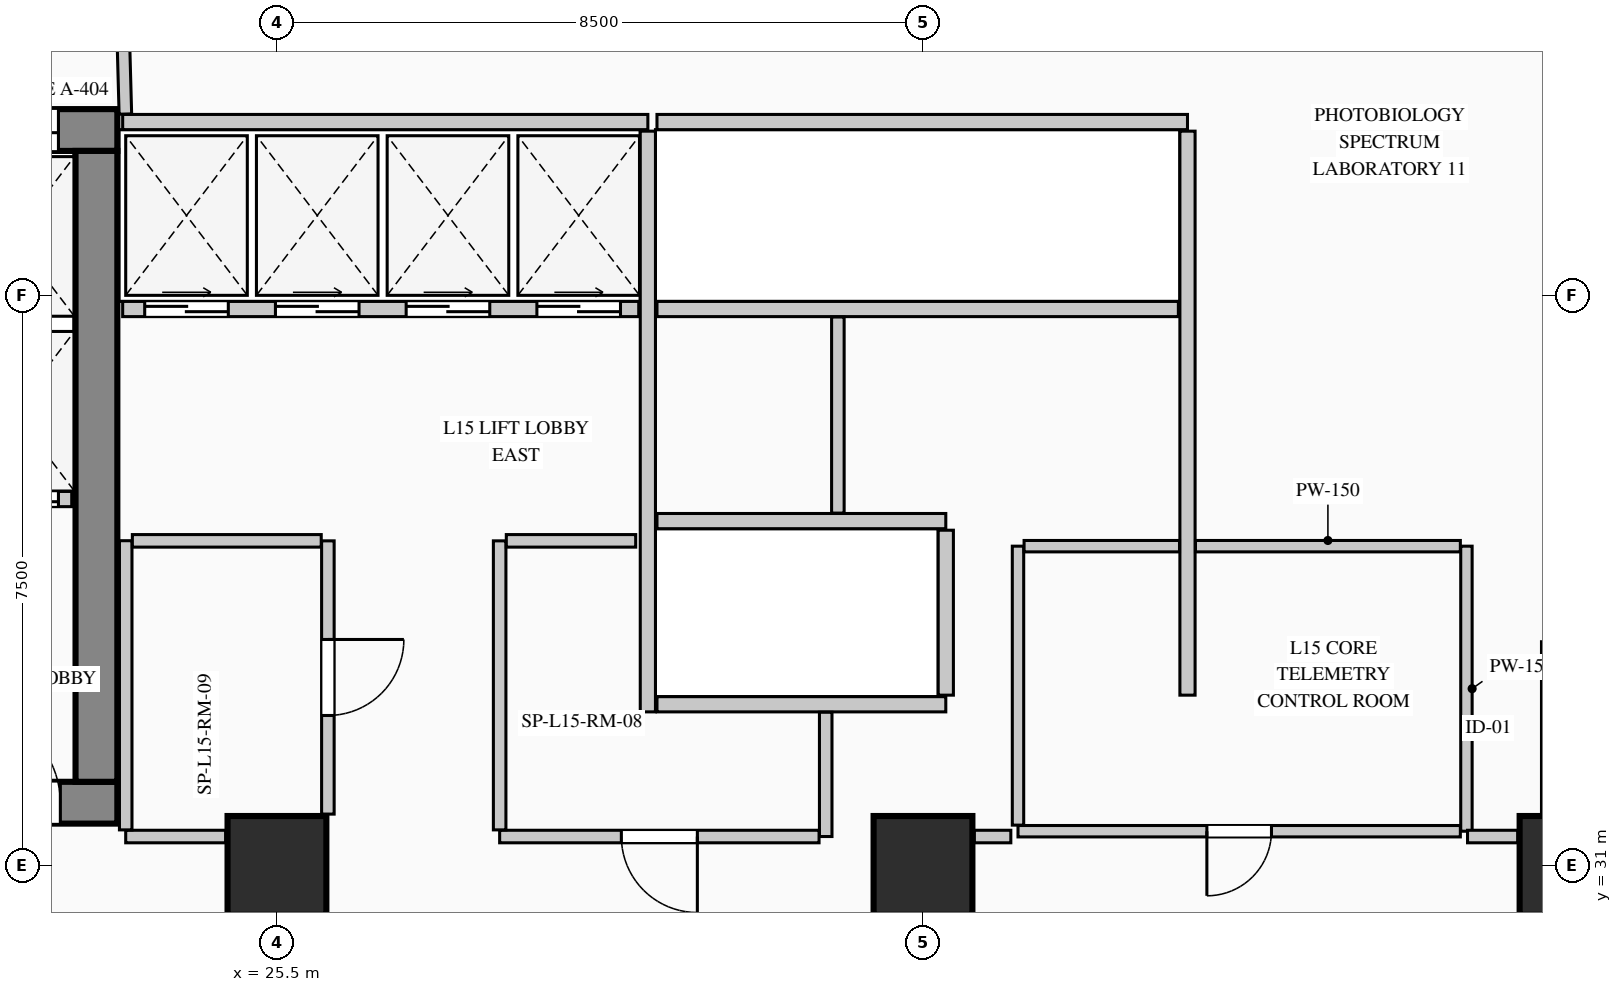
"""IFC4 building model, lengths in metres.
Left out: names, types, materials, properties, quantities, classifications, styles, units other than length and angle.
Written with IfcOpenShell. Run it as: python <this file> out.ifc"""

import sys

from ifc_helpers import new_model, si_unit, direction, frame, frame_2d, origin, origin_2d, place, context, subcontext, project, spatial, rectangle, extrude, element, fill, save


model = new_model("IFC4")
c1 = context("Model", 3, precision=1e-05, world=origin(), true_north=direction((0.0, 1.0)))
c2 = subcontext(c1, "Body", "Model", "MODEL_VIEW")
j1 = project(units=[si_unit("LENGTHUNIT", "METRE"), si_unit("PLANEANGLEUNIT", "RADIAN")], contexts=[c1])
p1 = place(None, origin())
s1 = spatial("IfcSite", under=j1, at=p1, CompositionType="ELEMENT")
p2 = place(p1, origin())
s2 = spatial("IfcBuilding", under=s1, at=p2, CompositionType="ELEMENT")
p3 = place(p2, frame((0.0, 0.0, 66.6)))
s3 = spatial("IfcBuildingStorey", under=s2, at=p3, CompositionType="ELEMENT", Elevation=66.6)
p4 = place(p3, frame((5.45, 40.675, 0.0), z_axis=(0.0, 0.0, 1.0), x_axis=(1.0, 0.0, 0.0)))
e1 = element("IfcWall", 1, at=p4, inside=s3, PredefinedType="SHEAR", context=c2, shape_type="SweptSolid", body=[
    extrude(rectangle(XDim=17.95, YDim=0.55, at=frame_2d((8.975, 0.0))), origin(), (0.0, 0.0, 1.0), 4.4),
])
p5 = place(p4, frame((15.995, 0.0, 0.0)))
e2 = element("IfcOpeningElement", 2, at=p5, cuts=e1, PredefinedType="OPENING", context=c2, shape_type="SweptSolid", body=[
    extrude(rectangle(XDim=1.18, YDim=2.25, at=frame_2d((0.59, 1.125))), frame((0.0, 0.285, 0.0), z_axis=(0.0, -1.0, 0.0), x_axis=(1.0, 0.0, 0.0)), (0.0, 0.0, 1.0), 0.57),
])
p6 = place(p3, frame((5.45, 31.825, 0.0), z_axis=(0.0, 0.0, 1.0), x_axis=(1.0, 0.0, 0.0)))
e3 = element("IfcWall", 3, at=p6, inside=s3, PredefinedType="SHEAR", context=c2, shape_type="SweptSolid", body=[
    extrude(rectangle(XDim=17.95, YDim=0.55, at=frame_2d((8.975, 0.0))), origin(), (0.0, 0.0, 1.0), 4.4),
])
p7 = place(p6, frame((3.2, 0.0, 0.0)))
e4 = element("IfcOpeningElement", 4, at=p7, cuts=e3, PredefinedType="OPENING", context=c2, shape_type="SweptSolid", body=[
    extrude(rectangle(XDim=1.2, YDim=2.2, at=frame_2d((0.6, 1.1))), frame((0.0, 0.285, 0.0), z_axis=(0.0, -1.0, 0.0), x_axis=(1.0, 0.0, 0.0)), (0.0, 0.0, 1.0), 0.57),
])
p8 = place(p6, frame((7.05, 0.0, 0.0)))
e5 = element("IfcOpeningElement", 5, at=p8, cuts=e3, PredefinedType="OPENING", context=c2, shape_type="SweptSolid", body=[
    extrude(rectangle(XDim=1.2, YDim=2.2, at=frame_2d((0.6, 1.1))), frame((0.0, 0.285, 0.0), z_axis=(0.0, -1.0, 0.0), x_axis=(1.0, 0.0, 0.0)), (0.0, 0.0, 1.0), 0.57),
])
p9 = place(p6, frame((8.9, 0.0, 0.0)))
e6 = element("IfcOpeningElement", 6, at=p9, cuts=e3, PredefinedType="OPENING", context=c2, shape_type="SweptSolid", body=[
    extrude(rectangle(XDim=1.15, YDim=2.2, at=frame_2d((0.575, 1.1))), frame((0.0, 0.285, 0.0), z_axis=(0.0, -1.0, 0.0), x_axis=(1.0, 0.0, 0.0)), (0.0, 0.0, 1.0), 0.57),
])
p10 = place(p6, frame((16.0, 0.0, 0.0)))
e7 = element("IfcOpeningElement", 7, at=p10, cuts=e3, PredefinedType="OPENING", context=c2, shape_type="SweptSolid", body=[
    extrude(rectangle(XDim=1.2, YDim=2.2, at=frame_2d((0.6, 1.1))), frame((0.0, 0.285, 0.0), z_axis=(0.0, -1.0, 0.0), x_axis=(1.0, 0.0, 0.0)), (0.0, 0.0, 1.0), 0.57),
])
p11 = place(p3, frame((23.125, 32.1, 0.0), z_axis=(0.0, 0.0, 1.0), x_axis=(0.0, 1.0, 0.0)))
e8 = element("IfcWall", 8, at=p11, inside=s3, PredefinedType="SHEAR", context=c2, shape_type="SweptSolid", body=[
    extrude(rectangle(XDim=8.3, YDim=0.55, at=frame_2d((4.15, 0.0))), origin(), (0.0, 0.0, 1.0), 4.4),
])
for number, where, z_axis, x_axis in (
    (9, (25.5, 31.0, 0.0), (0.0, 0.0, 1.0), (1.0, 0.0, 0.0)),
    (10, (34.0, 31.0, 0.0), (0.0, 0.0, 1.0), (1.0, 0.0, 0.0)),
    (11, (42.5, 31.0, 0.0), (0.0, 0.0, 1.0), (1.0, 0.0, 0.0)),
):
    element("IfcColumn", number, at=place(p3, frame(where, z_axis=z_axis, x_axis=x_axis)), inside=s3, PredefinedType="COLUMN", context=c2, shape_type="SweptSolid", body=[
        extrude(rectangle(XDim=1.3, YDim=1.3, at=origin_2d()), origin(), (0.0, 0.0, 1.0), 4.4),
    ])
p12 = place(p3, frame((21.3, 35.82, 0.0), z_axis=(0.0, 0.0, 1.0), x_axis=(1.0, 0.0, 0.0)))
e12 = element("IfcWall", 12, at=p12, inside=s3, PredefinedType="PARTITIONING", context=c2, shape_type="SweptSolid", body=[
    extrude(rectangle(XDim=1.5, YDim=0.2, at=frame_2d((0.75, 0.0))), origin(), (0.0, 0.0, 1.0), 4.1),
])
p13 = place(p12, frame((0.145, 0.0, 0.0)))
e13 = element("IfcOpeningElement", 13, at=p13, cuts=e12, PredefinedType="OPENING", context=c2, shape_type="SweptSolid", body=[
    extrude(rectangle(XDim=1.18, YDim=2.25, at=frame_2d((0.59, 1.125))), frame((0.0, 0.11, 0.0), z_axis=(0.0, -1.0, 0.0), x_axis=(1.0, 0.0, 0.0)), (0.0, 0.0, 1.0), 0.22),
])
p14 = place(p3, frame((23.47, 40.78, 0.0), z_axis=(0.0, 0.0, 1.0), x_axis=(1.0, 0.0, 0.0)))
e14 = element("IfcWall", 14, at=p14, inside=s3, PredefinedType="PARTITIONING", context=c2, shape_type="SweptSolid", body=[
    extrude(rectangle(XDim=6.91, YDim=0.2, at=frame_2d((3.455, 0.0))), origin(), (0.0, 0.0, 1.0), 4.1),
])
p15 = place(p3, frame((30.38, 33.02, 0.0), z_axis=(0.0, 0.0, 1.0), x_axis=(0.0, 1.0, 0.0)))
e15 = element("IfcWall", 15, at=p15, inside=s3, PredefinedType="PARTITIONING", context=c2, shape_type="SweptSolid", body=[
    extrude(rectangle(XDim=7.64, YDim=0.2, at=frame_2d((3.82, 0.0))), origin(), (0.0, 0.0, 1.0), 4.1),
])
p16 = place(p3, frame((23.47, 38.32, 0.0), z_axis=(0.0, 0.0, 1.0), x_axis=(1.0, 0.0, 0.0)))
e16 = element("IfcWall", 16, at=p16, inside=s3, PredefinedType="PARTITIONING", context=c2, shape_type="SweptSolid", body=[
    extrude(rectangle(XDim=6.79, YDim=0.2, at=frame_2d((3.395, 0.0))), origin(), (0.0, 0.0, 1.0), 4.1),
])
p17 = place(p16, frame((0.29, 0.0, 0.0)))
e17 = element("IfcOpeningElement", 17, at=p17, cuts=e16, PredefinedType="OPENING", context=c2, shape_type="SweptSolid", body=[
    extrude(rectangle(XDim=1.1, YDim=2.2, at=frame_2d((0.55, 1.1))), frame((0.0, 0.11, 0.0), z_axis=(0.0, -1.0, 0.0), x_axis=(1.0, 0.0, 0.0)), (0.0, 0.0, 1.0), 0.22),
])
p18 = place(p16, frame((2.01, 0.0, 0.0)))
e18 = element("IfcOpeningElement", 18, at=p18, cuts=e16, PredefinedType="OPENING", context=c2, shape_type="SweptSolid", body=[
    extrude(rectangle(XDim=1.1, YDim=2.2, at=frame_2d((0.55, 1.1))), frame((0.0, 0.11, 0.0), z_axis=(0.0, -1.0, 0.0), x_axis=(1.0, 0.0, 0.0)), (0.0, 0.0, 1.0), 0.22),
])
p19 = place(p16, frame((3.73, 0.0, 0.0)))
e19 = element("IfcOpeningElement", 19, at=p19, cuts=e16, PredefinedType="OPENING", context=c2, shape_type="SweptSolid", body=[
    extrude(rectangle(XDim=1.1, YDim=2.2, at=frame_2d((0.55, 1.1))), frame((0.0, 0.11, 0.0), z_axis=(0.0, -1.0, 0.0), x_axis=(1.0, 0.0, 0.0)), (0.0, 0.0, 1.0), 0.22),
])
p20 = place(p16, frame((5.45, 0.0, 0.0)))
e20 = element("IfcOpeningElement", 20, at=p20, cuts=e16, PredefinedType="OPENING", context=c2, shape_type="SweptSolid", body=[
    extrude(rectangle(XDim=1.1, YDim=2.2, at=frame_2d((0.55, 1.1))), frame((0.0, 0.11, 0.0), z_axis=(0.0, -1.0, 0.0), x_axis=(1.0, 0.0, 0.0)), (0.0, 0.0, 1.0), 0.22),
])
p21 = place(p3, frame((30.5, 40.78, 0.0), z_axis=(0.0, 0.0, 1.0), x_axis=(1.0, 0.0, 0.0)))
e21 = element("IfcWall", 21, at=p21, inside=s3, PredefinedType="PARTITIONING", context=c2, shape_type="SweptSolid", body=[
    extrude(rectangle(XDim=6.98, YDim=0.2, at=frame_2d((3.49, 0.0))), origin(), (0.0, 0.0, 1.0), 4.1),
])
p22 = place(p3, frame((37.48, 33.24, 0.0), z_axis=(0.0, 0.0, 1.0), x_axis=(0.0, 1.0, 0.0)))
e22 = element("IfcWall", 22, at=p22, inside=s3, PredefinedType="PARTITIONING", context=c2, shape_type="SweptSolid", body=[
    extrude(rectangle(XDim=7.42, YDim=0.2, at=frame_2d((3.71, 0.0))), origin(), (0.0, 0.0, 1.0), 4.1),
])
p23 = place(p3, frame((30.5, 38.32, 0.0), z_axis=(0.0, 0.0, 1.0), x_axis=(1.0, 0.0, 0.0)))
e23 = element("IfcWall", 23, at=p23, inside=s3, PredefinedType="PARTITIONING", context=c2, shape_type="SweptSolid", body=[
    extrude(rectangle(XDim=6.86, YDim=0.2, at=frame_2d((3.43, 0.0))), origin(), (0.0, 0.0, 1.0), 4.1),
])
for number, where, z_axis, x_axis in (
    (24, (30.5, 35.53, 0.0), (0.0, 0.0, 1.0), (1.0, 0.0, 0.0)),
    (25, (30.5, 33.12, 0.0), (0.0, 0.0, 1.0), (1.0, 0.0, 0.0)),
):
    element("IfcWall", number, at=place(p3, frame(where, z_axis=z_axis, x_axis=x_axis)), inside=s3, PredefinedType="PARTITIONING", context=c2, shape_type="SweptSolid", body=[
        extrude(rectangle(XDim=3.8, YDim=0.2, at=frame_2d((1.9, 0.0))), origin(), (0.0, 0.0, 1.0), 4.1),
    ])
p24 = place(p3, frame((34.3, 33.24, 0.0), z_axis=(0.0, 0.0, 1.0), x_axis=(0.0, 1.0, 0.0)))
e26 = element("IfcWall", 26, at=p24, inside=s3, PredefinedType="PARTITIONING", context=c2, shape_type="SweptSolid", body=[
    extrude(rectangle(XDim=2.17, YDim=0.2, at=frame_2d((1.085, 0.0))), origin(), (0.0, 0.0, 1.0), 4.1),
])
p25 = place(p3, frame((41.15, 35.2, 0.0), z_axis=(0.0, 0.0, 1.0), x_axis=(0.0, -1.0, 0.0)))
e27 = element("IfcWall", 27, at=p25, inside=s3, PredefinedType="PARTITIONING", context=c2, shape_type="SweptSolid", body=[
    extrude(rectangle(XDim=3.75, YDim=0.15, at=frame_2d((1.875, 0.0))), origin(), (0.0, 0.0, 1.0), 4.1),
])
p26 = place(p3, frame((41.07, 31.45, 0.0), z_axis=(0.0, 0.0, 1.0), x_axis=(-1.0, 0.0, 0.0)))
e28 = element("IfcWall", 28, at=p26, inside=s3, PredefinedType="PARTITIONING", context=c2, shape_type="SweptSolid", body=[
    extrude(rectangle(XDim=5.82, YDim=0.15, at=frame_2d((2.91, 0.0))), origin(), (0.0, 0.0, 1.0), 4.1),
])
p27 = place(p26, frame((2.485, 0.0, 0.0)))
e29 = element("IfcOpeningElement", 29, at=p27, cuts=e28, PredefinedType="OPENING", context=c2, shape_type="SweptSolid", body=[
    extrude(rectangle(XDim=0.85, YDim=2.1, at=frame_2d((0.425, 1.05))), frame((0.0, 0.085, 0.0), z_axis=(0.0, -1.0, 0.0), x_axis=(1.0, 0.0, 0.0)), (0.0, 0.0, 1.0), 0.17),
])
p28 = place(p3, frame((35.25, 31.53, 0.0), z_axis=(0.0, 0.0, 1.0), x_axis=(0.0, 1.0, 0.0)))
e30 = element("IfcWall", 30, at=p28, inside=s3, PredefinedType="PARTITIONING", context=c2, shape_type="SweptSolid", body=[
    extrude(rectangle(XDim=3.67, YDim=0.15, at=frame_2d((1.835, 0.0))), origin(), (0.0, 0.0, 1.0), 4.1),
])
p29 = place(p3, frame((35.33, 35.2, 0.0), z_axis=(0.0, 0.0, 1.0), x_axis=(1.0, 0.0, 0.0)))
e31 = element("IfcWall", 31, at=p29, inside=s3, PredefinedType="PARTITIONING", context=c2, shape_type="SweptSolid", body=[
    extrude(rectangle(XDim=2.045, YDim=0.15, at=frame_2d((1.022, 0.0))), origin(), (0.0, 0.0, 1.0), 4.1),
])
p30 = place(p3, frame((37.585, 35.2, 0.0), z_axis=(0.0, 0.0, 1.0), x_axis=(1.0, 0.0, 0.0)))
e32 = element("IfcWall", 32, at=p30, inside=s3, PredefinedType="PARTITIONING", context=c2, shape_type="SweptSolid", body=[
    extrude(rectangle(XDim=3.485, YDim=0.15, at=frame_2d((1.743, 0.0))), origin(), (0.0, 0.0, 1.0), 4.1),
])
p31 = place(p3, frame((32.72, 33.015, 0.0), z_axis=(0.0, 0.0, 1.0), x_axis=(0.0, -1.0, 0.0)))
e33 = element("IfcWall", 33, at=p31, inside=s3, PredefinedType="PARTITIONING", context=c2, shape_type="SweptSolid", body=[
    extrude(rectangle(XDim=1.635, YDim=0.165, at=frame_2d((0.817, 0.0))), origin(), (0.0, 0.0, 1.0), 4.1),
])
p32 = place(p3, frame((32.633, 31.38, 0.0), z_axis=(0.0, 0.0, 1.0), x_axis=(-1.0, 0.0, 0.0)))
e34 = element("IfcWall", 34, at=p32, inside=s3, PredefinedType="PARTITIONING", context=c2, shape_type="SweptSolid", body=[
    extrude(rectangle(XDim=4.203, YDim=0.165, at=frame_2d((2.101, 0.0))), origin(), (0.0, 0.0, 1.0), 4.1),
])
p33 = place(p32, frame((1.601, 0.0, 0.0)))
e35 = element("IfcOpeningElement", 35, at=p33, cuts=e34, PredefinedType="OPENING", context=c2, shape_type="SweptSolid", body=[
    extrude(rectangle(XDim=1.0, YDim=2.15, at=frame_2d((0.5, 1.075))), frame((0.0, 0.093, 0.0), z_axis=(0.0, -1.0, 0.0), x_axis=(1.0, 0.0, 0.0)), (0.0, 0.0, 1.0), 0.185),
])
p34 = place(p3, frame((28.43, 31.468, 0.0), z_axis=(0.0, 0.0, 1.0), x_axis=(0.0, 1.0, 0.0)))
e36 = element("IfcWall", 36, at=p34, inside=s3, PredefinedType="PARTITIONING", context=c2, shape_type="SweptSolid", body=[
    extrude(rectangle(XDim=3.802, YDim=0.165, at=frame_2d((1.901, 0.0))), origin(), (0.0, 0.0, 1.0), 4.1),
])
p35 = place(p3, frame((28.518, 35.27, 0.0), z_axis=(0.0, 0.0, 1.0), x_axis=(1.0, 0.0, 0.0)))
e37 = element("IfcWall", 37, at=p35, inside=s3, PredefinedType="PARTITIONING", context=c2, shape_type="SweptSolid", body=[
    extrude(rectangle(XDim=1.702, YDim=0.165, at=frame_2d((0.851, 0.0))), origin(), (0.0, 0.0, 1.0), 4.1),
])
p36 = place(p3, frame((26.17, 35.27, 0.0), z_axis=(0.0, 0.0, 1.0), x_axis=(0.0, -1.0, 0.0)))
e38 = element("IfcWall", 38, at=p36, inside=s3, PredefinedType="PARTITIONING", context=c2, shape_type="SweptSolid", body=[
    extrude(rectangle(XDim=3.595, YDim=0.165, at=frame_2d((1.797, 0.0))), origin(), (0.0, 0.0, 1.0), 4.1),
])
p37 = place(p36, frame((1.298, 0.0, 0.0)))
e39 = element("IfcOpeningElement", 39, at=p37, cuts=e38, PredefinedType="OPENING", context=c2, shape_type="SweptSolid", body=[
    extrude(rectangle(XDim=1.0, YDim=2.15, at=frame_2d((0.5, 1.075))), frame((0.0, 0.093, 0.0), z_axis=(0.0, -1.0, 0.0), x_axis=(1.0, 0.0, 0.0)), (0.0, 0.0, 1.0), 0.185),
])
p38 = place(p3, frame((24.825, 31.38, 0.0), z_axis=(0.0, 0.0, 1.0), x_axis=(-1.0, 0.0, 0.0)))
e40 = element("IfcWall", 40, at=p38, inside=s3, PredefinedType="PARTITIONING", context=c2, shape_type="SweptSolid", body=[
    extrude(rectangle(XDim=1.315, YDim=0.165, at=frame_2d((0.657, 0.0))), origin(), (0.0, 0.0, 1.0), 4.1),
])
p39 = place(p3, frame((23.51, 31.468, 0.0), z_axis=(0.0, 0.0, 1.0), x_axis=(0.0, 1.0, 0.0)))
e41 = element("IfcWall", 41, at=p39, inside=s3, PredefinedType="PARTITIONING", context=c2, shape_type="SweptSolid", body=[
    extrude(rectangle(XDim=3.804, YDim=0.165, at=frame_2d((1.902, 0.0))), origin(), (0.0, 0.0, 1.0), 4.1),
])
p40 = place(p3, frame((23.597, 35.27, 0.0), z_axis=(0.0, 0.0, 1.0), x_axis=(1.0, 0.0, 0.0)))
e42 = element("IfcWall", 42, at=p40, inside=s3, PredefinedType="PARTITIONING", context=c2, shape_type="SweptSolid", body=[
    extrude(rectangle(XDim=2.485, YDim=0.165, at=frame_2d((1.243, 0.0))), origin(), (0.0, 0.0, 1.0), 4.1),
])
p41 = place(p3, frame((42.22, 33.942, 0.0), z_axis=(0.0, 0.0, 1.0), x_axis=(0.0, -1.0, 0.0)))
e43 = element("IfcWall", 43, at=p41, inside=s3, PredefinedType="PARTITIONING", context=c2, shape_type="SweptSolid", body=[
    extrude(rectangle(XDim=2.267, YDim=0.165, at=frame_2d((1.134, 0.0))), origin(), (0.0, 0.0, 1.0), 4.1),
])
p42 = place(p41, frame((0.634, 0.0, 0.0)))
e44 = element("IfcOpeningElement", 44, at=p42, cuts=e43, PredefinedType="OPENING", context=c2, shape_type="SweptSolid", body=[
    extrude(rectangle(XDim=1.0, YDim=2.15, at=frame_2d((0.5, 1.075))), frame((0.0, 0.093, 0.0), z_axis=(0.0, -1.0, 0.0), x_axis=(1.0, 0.0, 0.0)), (0.0, 0.0, 1.0), 0.185),
])
p43 = place(p3, frame((41.825, 31.38, 0.0), z_axis=(0.0, 0.0, 1.0), x_axis=(-1.0, 0.0, 0.0)))
e45 = element("IfcWall", 45, at=p43, inside=s3, PredefinedType="PARTITIONING", context=c2, shape_type="SweptSolid", body=[
    extrude(rectangle(XDim=0.66, YDim=0.165, at=frame_2d((0.33, 0.0))), origin(), (0.0, 0.0, 1.0), 4.1),
])
p44 = place(p3, frame((35.156, 31.38, 0.0), z_axis=(0.0, 0.0, 1.0), x_axis=(-1.0, 0.0, 0.0)))
e46 = element("IfcWall", 46, at=p44, inside=s3, PredefinedType="PARTITIONING", context=c2, shape_type="SweptSolid", body=[
    extrude(rectangle(XDim=0.48, YDim=0.165, at=frame_2d((0.24, 0.0))), origin(), (0.0, 0.0, 1.0), 4.1),
])
p45 = place(p3, frame((32.88, 35.635, 0.0), z_axis=(0.0, 0.0, 1.0), x_axis=(0.0, 1.0, 0.0)))
e47 = element("IfcWall", 47, at=p45, inside=s3, PredefinedType="PARTITIONING", context=c2, shape_type="SweptSolid", body=[
    extrude(rectangle(XDim=2.58, YDim=0.165, at=frame_2d((1.29, 0.0))), origin(), (0.0, 0.0, 1.0), 4.1),
])
p46 = place(p3, frame((23.506, 40.885, 0.0), z_axis=(0.0, 0.0, 1.0), x_axis=(-0.027441464163, 0.999623412113, 0.0)))
e48 = element("IfcWall", 48, at=p46, inside=s3, PredefinedType="PARTITIONING", context=c2, shape_type="SweptSolid", body=[
    extrude(rectangle(XDim=2.331, YDim=0.165, at=frame_2d((1.166, 0.0))), origin(), (0.0, 0.0, 1.0), 4.1),
])
p47 = place(p10, origin())
e49 = element("IfcDoor", 49, at=p47, inside=s3, OperationType="SINGLE_SWING_LEFT", PredefinedType="DOOR", context=c2, shape_type="SweptSolid", body=[
    extrude(rectangle(XDim=1.2, YDim=2.2, at=frame_2d((0.6, 1.1))), frame((0.0, 0.025, 0.0), z_axis=(0.0, -1.0, 0.0), x_axis=(1.0, 0.0, 0.0)), (0.0, 0.0, 1.0), 0.05),
])
fill(e7, e49)
p48 = place(p5, origin())
e50 = element("IfcDoor", 50, at=p48, inside=s3, OperationType="DOUBLE_DOOR_SLIDING", PredefinedType="DOOR", context=c2, shape_type="SweptSolid", body=[
    extrude(rectangle(XDim=1.18, YDim=2.25, at=frame_2d((0.59, 1.125))), frame((0.0, 0.025, 0.0), z_axis=(0.0, -1.0, 0.0), x_axis=(1.0, 0.0, 0.0)), (0.0, 0.0, 1.0), 0.05),
])
fill(e2, e50)
p49 = place(p13, origin())
e51 = element("IfcDoor", 51, at=p49, inside=s3, OperationType="DOUBLE_DOOR_SLIDING", PredefinedType="DOOR", context=c2, shape_type="SweptSolid", body=[
    extrude(rectangle(XDim=1.18, YDim=2.25, at=frame_2d((0.59, 1.125))), frame((0.0, 0.025, 0.0), z_axis=(0.0, -1.0, 0.0), x_axis=(1.0, 0.0, 0.0)), (0.0, 0.0, 1.0), 0.05),
])
fill(e13, e51)
p50 = place(p17, origin())
e52 = element("IfcDoor", 52, at=p50, inside=s3, OperationType="DOUBLE_DOOR_SLIDING", PredefinedType="DOOR", context=c2, shape_type="SweptSolid", body=[
    extrude(rectangle(XDim=1.1, YDim=2.2, at=frame_2d((0.55, 1.1))), frame((0.0, 0.025, 0.0), z_axis=(0.0, -1.0, 0.0), x_axis=(1.0, 0.0, 0.0)), (0.0, 0.0, 1.0), 0.05),
])
fill(e17, e52)
p51 = place(p18, origin())
e53 = element("IfcDoor", 53, at=p51, inside=s3, OperationType="DOUBLE_DOOR_SLIDING", PredefinedType="DOOR", context=c2, shape_type="SweptSolid", body=[
    extrude(rectangle(XDim=1.1, YDim=2.2, at=frame_2d((0.55, 1.1))), frame((0.0, 0.025, 0.0), z_axis=(0.0, -1.0, 0.0), x_axis=(1.0, 0.0, 0.0)), (0.0, 0.0, 1.0), 0.05),
])
fill(e18, e53)
p52 = place(p19, origin())
e54 = element("IfcDoor", 54, at=p52, inside=s3, OperationType="DOUBLE_DOOR_SLIDING", PredefinedType="DOOR", context=c2, shape_type="SweptSolid", body=[
    extrude(rectangle(XDim=1.1, YDim=2.2, at=frame_2d((0.55, 1.1))), frame((0.0, 0.025, 0.0), z_axis=(0.0, -1.0, 0.0), x_axis=(1.0, 0.0, 0.0)), (0.0, 0.0, 1.0), 0.05),
])
fill(e19, e54)
p53 = place(p20, origin())
e55 = element("IfcDoor", 55, at=p53, inside=s3, OperationType="DOUBLE_DOOR_SLIDING", PredefinedType="DOOR", context=c2, shape_type="SweptSolid", body=[
    extrude(rectangle(XDim=1.1, YDim=2.2, at=frame_2d((0.55, 1.1))), frame((0.0, 0.025, 0.0), z_axis=(0.0, -1.0, 0.0), x_axis=(1.0, 0.0, 0.0)), (0.0, 0.0, 1.0), 0.05),
])
fill(e20, e55)
p54 = place(p27, origin())
e56 = element("IfcDoor", 56, at=p54, inside=s3, OperationType="SINGLE_SWING_RIGHT", PredefinedType="DOOR", context=c2, shape_type="SweptSolid", body=[
    extrude(rectangle(XDim=0.85, YDim=2.1, at=frame_2d((0.425, 1.05))), frame((0.0, 0.025, 0.0), z_axis=(0.0, -1.0, 0.0), x_axis=(1.0, 0.0, 0.0)), (0.0, 0.0, 1.0), 0.05),
])
fill(e29, e56)
p55 = place(p33, origin())
e57 = element("IfcDoor", 57, at=p55, inside=s3, OperationType="SINGLE_SWING_LEFT", PredefinedType="DOOR", context=c2, shape_type="SweptSolid", body=[
    extrude(rectangle(XDim=1.0, YDim=2.15, at=frame_2d((0.5, 1.075))), frame((0.0, 0.025, 0.0), z_axis=(0.0, -1.0, 0.0), x_axis=(1.0, 0.0, 0.0)), (0.0, 0.0, 1.0), 0.05),
])
fill(e35, e57)
p56 = place(p37, origin())
e58 = element("IfcDoor", 58, at=p56, inside=s3, OperationType="SINGLE_SWING_LEFT", PredefinedType="DOOR", context=c2, shape_type="SweptSolid", body=[
    extrude(rectangle(XDim=1.0, YDim=2.15, at=frame_2d((0.5, 1.075))), frame((0.0, 0.025, 0.0), z_axis=(0.0, -1.0, 0.0), x_axis=(1.0, 0.0, 0.0)), (0.0, 0.0, 1.0), 0.05),
])
fill(e39, e58)
save(model, sys.argv[1])
